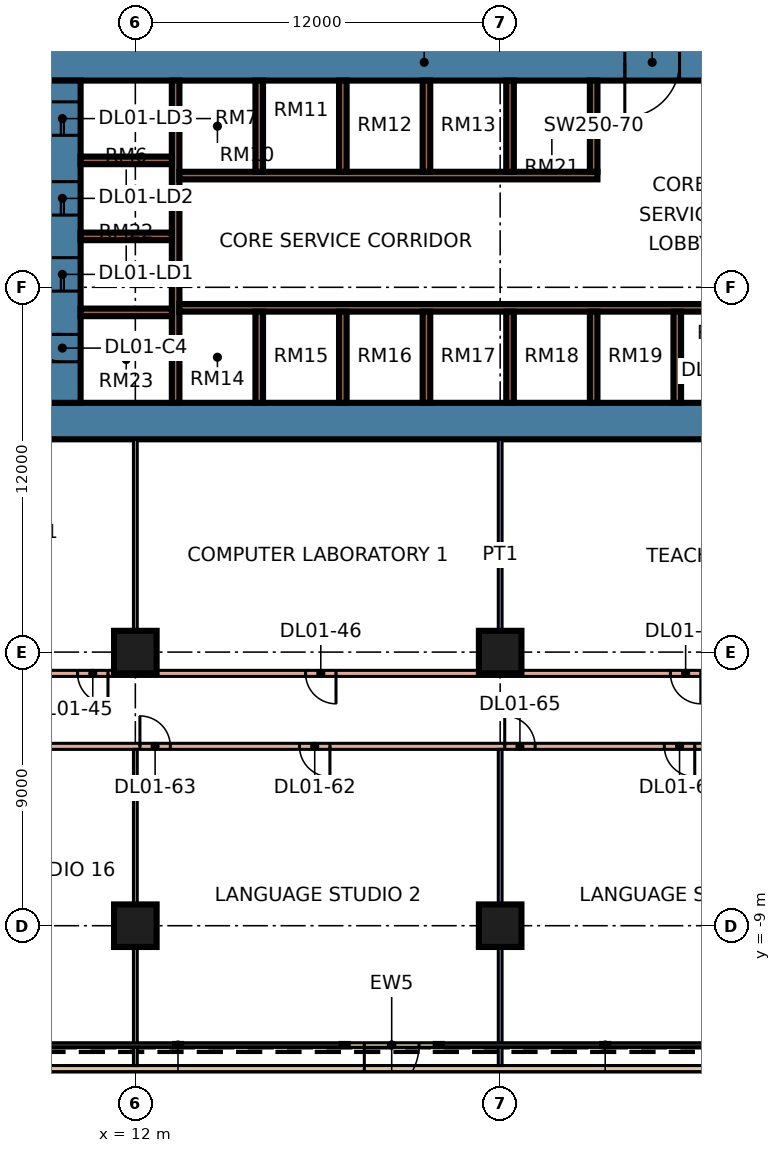
"""IFC4 building model, lengths in metres.
Left out: names, types, materials, properties, quantities, classifications, styles, units other than length and angle.
Written with IfcOpenShell. Run it as: python <this file> out.ifc"""

import sys

from ifc_helpers import new_model, si_unit, direction, frame, frame_2d, origin, origin_2d, place, context, subcontext, project, spatial, rectangle, extrude, element, fill, save


model = new_model("IFC4")
c1 = context("Model", 3, precision=1e-05, world=origin(), true_north=direction((0.0, 1.0)))
c2 = subcontext(c1, "Body", "Model", "MODEL_VIEW")
j1 = project(units=[si_unit("LENGTHUNIT", "METRE"), si_unit("PLANEANGLEUNIT", "RADIAN")], contexts=[c1])
p1 = place(None, origin())
s1 = spatial("IfcSite", under=j1, at=p1, CompositionType="ELEMENT")
p2 = place(p1, origin())
s2 = spatial("IfcBuilding", under=s1, at=p2, CompositionType="ELEMENT")
p3 = place(p2, frame((0.0, 0.0, 7.2)))
s3 = spatial("IfcBuildingStorey", under=s2, at=p3, CompositionType="ELEMENT", Elevation=7.2)
for number, where, z_axis, x_axis in (
    (1, (12.0, -9.0, 0.0), (0.0, 0.0, 1.0), (1.0, 0.0, 0.0)),
    (2, (24.0, -9.0, 0.0), (0.0, 0.0, 1.0), (1.0, 0.0, 0.0)),
    (3, (12.0, 0.0, 0.0), (0.0, 0.0, 1.0), (1.0, 0.0, 0.0)),
    (4, (24.0, 0.0, 0.0), (0.0, 0.0, 1.0), (1.0, 0.0, 0.0)),
):
    element("IfcColumn", number, at=place(p3, frame(where, z_axis=z_axis, x_axis=x_axis)), inside=s3, PredefinedType="COLUMN", context=c2, shape_type="SweptSolid", body=[
        extrude(rectangle(XDim=1.4, YDim=1.4, at=origin_2d()), origin(), (0.0, 0.0, 1.0), 4.8),
    ])
p4 = place(p3, frame((9.0, 7.6, 0.0), z_axis=(0.0, 0.0, 1.0), x_axis=(1.0, 0.0, 0.0)))
e5 = element("IfcWall", 5, at=p4, inside=s3, PredefinedType="SHEAR", context=c2, shape_type="SweptSolid", body=[
    extrude(rectangle(XDim=25.0, YDim=1.2, at=frame_2d((12.5, 0.0))), origin(), (0.0, 0.0, 1.0), 4.8),
])
p5 = place(p3, frame((9.0, 19.4, 0.0), z_axis=(0.0, 0.0, 1.0), x_axis=(1.0, 0.0, 0.0)))
e6 = element("IfcWall", 6, at=p5, inside=s3, PredefinedType="SHEAR", context=c2, shape_type="SweptSolid", body=[
    extrude(rectangle(XDim=25.0, YDim=1.2, at=frame_2d((12.5, 0.0))), origin(), (0.0, 0.0, 1.0), 4.8),
])
p6 = place(p5, frame((19.1, 0.0, 0.0)))
e7 = element("IfcOpeningElement", 7, at=p6, cuts=e6, PredefinedType="OPENING", context=c2, shape_type="SweptSolid", body=[
    extrude(rectangle(XDim=1.8, YDim=2.4, at=frame_2d((0.9, 1.2))), frame((0.0, 0.61, 0.0), z_axis=(0.0, -1.0, 0.0), x_axis=(1.0, 0.0, 0.0)), (0.0, 0.0, 1.0), 1.22),
])
p7 = place(p3, frame((9.6, 8.2, 0.0), z_axis=(0.0, 0.0, 1.0), x_axis=(0.0, 1.0, 0.0)))
e8 = element("IfcWall", 8, at=p7, inside=s3, PredefinedType="SHEAR", context=c2, shape_type="SweptSolid", body=[
    extrude(rectangle(XDim=10.6, YDim=1.2, at=frame_2d((5.3, 0.0))), origin(), (0.0, 0.0, 1.0), 4.8),
])
p8 = place(p7, frame((3.675, 0.0, 0.0)))
e9 = element("IfcOpeningElement", 9, at=p8, cuts=e8, PredefinedType="OPENING", context=c2, shape_type="SweptSolid", body=[
    extrude(rectangle(XDim=1.1, YDim=2.2, at=frame_2d((0.55, 1.1))), frame((0.0, 0.61, 0.0), z_axis=(0.0, -1.0, 0.0), x_axis=(1.0, 0.0, 0.0)), (0.0, 0.0, 1.0), 1.22),
])
p9 = place(p7, frame((6.175, 0.0, 0.0)))
e10 = element("IfcOpeningElement", 10, at=p9, cuts=e8, PredefinedType="OPENING", context=c2, shape_type="SweptSolid", body=[
    extrude(rectangle(XDim=1.1, YDim=2.2, at=frame_2d((0.55, 1.1))), frame((0.0, 0.61, 0.0), z_axis=(0.0, -1.0, 0.0), x_axis=(1.0, 0.0, 0.0)), (0.0, 0.0, 1.0), 1.22),
])
p10 = place(p7, frame((8.8, 0.0, 0.0)))
e11 = element("IfcOpeningElement", 11, at=p10, cuts=e8, PredefinedType="OPENING", context=c2, shape_type="SweptSolid", body=[
    extrude(rectangle(XDim=1.1, YDim=2.2, at=frame_2d((0.55, 1.1))), frame((0.0, 0.61, 0.0), z_axis=(0.0, -1.0, 0.0), x_axis=(1.0, 0.0, 0.0)), (0.0, 0.0, 1.0), 1.22),
])
p11 = place(p7, frame((1.35, 0.0, 0.0)))
e12 = element("IfcOpeningElement", 12, at=p11, cuts=e8, PredefinedType="OPENING", context=c2, shape_type="SweptSolid", body=[
    extrude(rectangle(XDim=0.9, YDim=2.1, at=frame_2d((0.45, 1.05))), frame((0.0, 0.61, 0.0), z_axis=(0.0, -1.0, 0.0), x_axis=(1.0, 0.0, 0.0)), (0.0, 0.0, 1.0), 1.22),
])
p12 = place(p3, frame((13.325, 8.2, 0.0), z_axis=(0.0, 0.0, 1.0), x_axis=(0.0, 1.0, 0.0)))
e13 = element("IfcWall", 13, at=p12, inside=s3, PredefinedType="SHEAR", context=c2, shape_type="SweptSolid", body=[
    extrude(rectangle(XDim=10.6, YDim=0.25, at=frame_2d((5.3, 0.0))), origin(), (0.0, 0.0, 1.0), 4.8),
])
p13 = place(p3, frame((13.45, 11.325, 0.0), z_axis=(0.0, 0.0, 1.0), x_axis=(1.0, 0.0, 0.0)))
e14 = element("IfcWall", 14, at=p13, inside=s3, PredefinedType="SHEAR", context=c2, shape_type="SweptSolid", body=[
    extrude(rectangle(XDim=19.35, YDim=0.25, at=frame_2d((9.675, 0.0))), origin(), (0.0, 0.0, 1.0), 4.8),
])
p14 = place(p3, frame((13.45, 15.675, 0.0), z_axis=(0.0, 0.0, 1.0), x_axis=(1.0, 0.0, 0.0)))
e15 = element("IfcWall", 15, at=p14, inside=s3, PredefinedType="SHEAR", context=c2, shape_type="SweptSolid", body=[
    extrude(rectangle(XDim=13.75, YDim=0.25, at=frame_2d((6.875, 0.0))), origin(), (0.0, 0.0, 1.0), 4.8),
])
for number, where, z_axis, x_axis in (
    (16, (10.2, 11.175, 0.0), (0.0, 0.0, 1.0), (1.0, 0.0, 0.0)),
    (17, (10.2, 13.675, 0.0), (0.0, 0.0, 1.0), (1.0, 0.0, 0.0)),
    (18, (10.2, 16.175, 0.0), (0.0, 0.0, 1.0), (1.0, 0.0, 0.0)),
    (19, (16.075, 8.2, 0.0), (0.0, 0.0, 1.0), (0.0, 1.0, 0.0)),
    (20, (18.825, 8.2, 0.0), (0.0, 0.0, 1.0), (0.0, 1.0, 0.0)),
    (21, (21.575, 8.2, 0.0), (0.0, 0.0, 1.0), (0.0, 1.0, 0.0)),
    (22, (24.325, 8.2, 0.0), (0.0, 0.0, 1.0), (0.0, 1.0, 0.0)),
    (23, (27.075, 8.2, 0.0), (0.0, 0.0, 1.0), (0.0, 1.0, 0.0)),
    (24, (29.825, 8.2, 0.0), (0.0, 0.0, 1.0), (0.0, 1.0, 0.0)),
    (25, (16.075, 15.8, 0.0), (0.0, 0.0, 1.0), (0.0, 1.0, 0.0)),
    (26, (18.825, 15.8, 0.0), (0.0, 0.0, 1.0), (0.0, 1.0, 0.0)),
    (27, (21.575, 15.8, 0.0), (0.0, 0.0, 1.0), (0.0, 1.0, 0.0)),
    (28, (24.325, 15.8, 0.0), (0.0, 0.0, 1.0), (0.0, 1.0, 0.0)),
    (29, (27.075, 15.8, 0.0), (0.0, 0.0, 1.0), (0.0, 1.0, 0.0)),
):
    element("IfcWall", number, at=place(p3, frame(where, z_axis=z_axis, x_axis=x_axis)), inside=s3, PredefinedType="SHEAR", context=c2, shape_type="SweptSolid", body=[
        extrude(rectangle(XDim=3.0, YDim=0.25, at=frame_2d((1.5, 0.0))), origin(), (0.0, 0.0, 1.0), 4.8),
    ])
p15 = place(p3, frame((18.932, -12.925, 0.0), z_axis=(0.0, 0.0, 1.0), x_axis=(1.0, 0.0, 0.0)))
e30 = element("IfcWall", 30, at=p15, inside=s3, PredefinedType="SOLIDWALL", context=c2, shape_type="SweptSolid", body=[
    extrude(rectangle(XDim=3.0, YDim=0.15, at=frame_2d((1.5, 0.0))), origin(), (0.0, 0.0, 1.0), 4.4),
])
p16 = place(p15, frame((0.6, 0.0, 0.0)))
e31 = element("IfcOpeningElement", 31, at=p16, cuts=e30, PredefinedType="OPENING", context=c2, shape_type="SweptSolid", body=[
    extrude(rectangle(XDim=1.8, YDim=2.4, at=frame_2d((0.9, 1.2))), frame((0.0, 0.085, 0.0), z_axis=(0.0, -1.0, 0.0), x_axis=(1.0, 0.0, 0.0)), (0.0, 0.0, 1.0), 0.17),
])
p17 = place(p3, frame((75.553, -13.7, 0.0), z_axis=(0.0, 0.0, 1.0), x_axis=(-1.0, 0.0, 0.0)))
e32 = element("IfcWall", 32, at=p17, inside=s3, PredefinedType="PARAPET", context=c2, shape_type="SweptSolid", body=[
    extrude(rectangle(XDim=68.107, YDim=0.2, at=frame_2d((34.053, 0.0))), origin(), (0.0, 0.0, 1.0), 0.5),
])
p18 = place(p3, frame((-1.953, -3.1, 0.0), z_axis=(0.0, 0.0, 1.0), x_axis=(1.0, 0.0, 0.0)))
e33 = element("IfcWall", 33, at=p18, inside=s3, PredefinedType="PARTITIONING", context=c2, shape_type="SweptSolid", body=[
    extrude(rectangle(XDim=77.053, YDim=0.2, at=frame_2d((38.526, 0.0))), origin(), (0.0, 0.0, 1.0), 4.4),
])
p19 = place(p18, frame((7.353, 0.0, 0.0)))
e34 = element("IfcOpeningElement", 34, at=p19, cuts=e33, PredefinedType="OPENING", context=c2, shape_type="SweptSolid", body=[
    extrude(rectangle(XDim=1.0, YDim=2.1, at=frame_2d((0.5, 1.05))), frame((0.0, 0.11, 0.0), z_axis=(0.0, -1.0, 0.0), x_axis=(1.0, 0.0, 0.0)), (0.0, 0.0, 1.0), 0.22),
])
p20 = place(p18, frame((19.353, 0.0, 0.0)))
e35 = element("IfcOpeningElement", 35, at=p20, cuts=e33, PredefinedType="OPENING", context=c2, shape_type="SweptSolid", body=[
    extrude(rectangle(XDim=1.0, YDim=2.1, at=frame_2d((0.5, 1.05))), frame((0.0, 0.11, 0.0), z_axis=(0.0, -1.0, 0.0), x_axis=(1.0, 0.0, 0.0)), (0.0, 0.0, 1.0), 0.22),
])
p21 = place(p18, frame((14.103, 0.0, 0.0)))
e36 = element("IfcOpeningElement", 36, at=p21, cuts=e33, PredefinedType="OPENING", context=c2, shape_type="SweptSolid", body=[
    extrude(rectangle(XDim=1.0, YDim=2.1, at=frame_2d((0.5, 1.05))), frame((0.0, 0.11, 0.0), z_axis=(0.0, -1.0, 0.0), x_axis=(1.0, 0.0, 0.0)), (0.0, 0.0, 1.0), 0.22),
])
p22 = place(p18, frame((31.353, 0.0, 0.0)))
e37 = element("IfcOpeningElement", 37, at=p22, cuts=e33, PredefinedType="OPENING", context=c2, shape_type="SweptSolid", body=[
    extrude(rectangle(XDim=1.0, YDim=2.1, at=frame_2d((0.5, 1.05))), frame((0.0, 0.11, 0.0), z_axis=(0.0, -1.0, 0.0), x_axis=(1.0, 0.0, 0.0)), (0.0, 0.0, 1.0), 0.22),
])
p23 = place(p18, frame((26.103, 0.0, 0.0)))
e38 = element("IfcOpeningElement", 38, at=p23, cuts=e33, PredefinedType="OPENING", context=c2, shape_type="SweptSolid", body=[
    extrude(rectangle(XDim=1.0, YDim=2.1, at=frame_2d((0.5, 1.05))), frame((0.0, 0.11, 0.0), z_axis=(0.0, -1.0, 0.0), x_axis=(1.0, 0.0, 0.0)), (0.0, 0.0, 1.0), 0.22),
])
p24 = place(p18, frame((41.853, 0.0, 0.0)))
e39 = element("IfcOpeningElement", 39, at=p24, cuts=e33, PredefinedType="OPENING", context=c2, shape_type="SweptSolid", body=[
    extrude(rectangle(XDim=1.0, YDim=2.1, at=frame_2d((0.5, 1.05))), frame((0.0, 0.11, 0.0), z_axis=(0.0, -1.0, 0.0), x_axis=(1.0, 0.0, 0.0)), (0.0, 0.0, 1.0), 0.22),
])
p25 = place(p18, frame((50.853, 0.0, 0.0)))
e40 = element("IfcOpeningElement", 40, at=p25, cuts=e33, PredefinedType="OPENING", context=c2, shape_type="SweptSolid", body=[
    extrude(rectangle(XDim=1.0, YDim=2.1, at=frame_2d((0.5, 1.05))), frame((0.0, 0.11, 0.0), z_axis=(0.0, -1.0, 0.0), x_axis=(1.0, 0.0, 0.0)), (0.0, 0.0, 1.0), 0.22),
])
p26 = place(p18, frame((59.853, 0.0, 0.0)))
e41 = element("IfcOpeningElement", 41, at=p26, cuts=e33, PredefinedType="OPENING", context=c2, shape_type="SweptSolid", body=[
    extrude(rectangle(XDim=1.0, YDim=2.1, at=frame_2d((0.5, 1.05))), frame((0.0, 0.11, 0.0), z_axis=(0.0, -1.0, 0.0), x_axis=(1.0, 0.0, 0.0)), (0.0, 0.0, 1.0), 0.22),
])
p27 = place(p18, frame((68.853, 0.0, 0.0)))
e42 = element("IfcOpeningElement", 42, at=p27, cuts=e33, PredefinedType="OPENING", context=c2, shape_type="SweptSolid", body=[
    extrude(rectangle(XDim=1.0, YDim=2.1, at=frame_2d((0.5, 1.05))), frame((0.0, 0.11, 0.0), z_axis=(0.0, -1.0, 0.0), x_axis=(1.0, 0.0, 0.0)), (0.0, 0.0, 1.0), 0.22),
])
p28 = place(p18, frame((75.103, 0.0, 0.0)))
e43 = element("IfcOpeningElement", 43, at=p28, cuts=e33, PredefinedType="OPENING", context=c2, shape_type="SweptSolid", body=[
    extrude(rectangle(XDim=1.0, YDim=2.1, at=frame_2d((0.5, 1.05))), frame((0.0, 0.11, 0.0), z_axis=(0.0, -1.0, 0.0), x_axis=(1.0, 0.0, 0.0)), (0.0, 0.0, 1.0), 0.22),
])
p29 = place(p3, frame((-0.8, -0.7, 0.0), z_axis=(0.0, 0.0, 1.0), x_axis=(1.0, 0.0, 0.0)))
e44 = element("IfcWall", 44, at=p29, inside=s3, PredefinedType="PARTITIONING", context=c2, shape_type="SweptSolid", body=[
    extrude(rectangle(XDim=45.8, YDim=0.2, at=frame_2d((22.9, 0.0))), origin(), (0.0, 0.0, 1.0), 4.4),
])
p30 = place(p29, frame((40.9, 0.0, 0.0)))
e45 = element("IfcOpeningElement", 45, at=p30, cuts=e44, PredefinedType="OPENING", context=c2, shape_type="SweptSolid", body=[
    extrude(rectangle(XDim=1.0, YDim=2.1, at=frame_2d((0.5, 1.05))), frame((0.0, 0.11, 0.0), z_axis=(0.0, -1.0, 0.0), x_axis=(1.0, 0.0, 0.0)), (0.0, 0.0, 1.0), 0.22),
])
p31 = place(p29, frame((5.9, 0.0, 0.0)))
e46 = element("IfcOpeningElement", 46, at=p31, cuts=e44, PredefinedType="OPENING", context=c2, shape_type="SweptSolid", body=[
    extrude(rectangle(XDim=1.0, YDim=2.1, at=frame_2d((0.5, 1.05))), frame((0.0, 0.11, 0.0), z_axis=(0.0, -1.0, 0.0), x_axis=(1.0, 0.0, 0.0)), (0.0, 0.0, 1.0), 0.22),
])
p32 = place(p29, frame((10.9, 0.0, 0.0)))
e47 = element("IfcOpeningElement", 47, at=p32, cuts=e44, PredefinedType="OPENING", context=c2, shape_type="SweptSolid", body=[
    extrude(rectangle(XDim=1.0, YDim=2.1, at=frame_2d((0.5, 1.05))), frame((0.0, 0.11, 0.0), z_axis=(0.0, -1.0, 0.0), x_axis=(1.0, 0.0, 0.0)), (0.0, 0.0, 1.0), 0.22),
])
p33 = place(p29, frame((18.4, 0.0, 0.0)))
e48 = element("IfcOpeningElement", 48, at=p33, cuts=e44, PredefinedType="OPENING", context=c2, shape_type="SweptSolid", body=[
    extrude(rectangle(XDim=1.0, YDim=2.1, at=frame_2d((0.5, 1.05))), frame((0.0, 0.11, 0.0), z_axis=(0.0, -1.0, 0.0), x_axis=(1.0, 0.0, 0.0)), (0.0, 0.0, 1.0), 0.22),
])
p34 = place(p29, frame((30.4, 0.0, 0.0)))
e49 = element("IfcOpeningElement", 49, at=p34, cuts=e44, PredefinedType="OPENING", context=c2, shape_type="SweptSolid", body=[
    extrude(rectangle(XDim=1.0, YDim=2.1, at=frame_2d((0.5, 1.05))), frame((0.0, 0.11, 0.0), z_axis=(0.0, -1.0, 0.0), x_axis=(1.0, 0.0, 0.0)), (0.0, 0.0, 1.0), 0.22),
])
p35 = place(p3, frame((12.0, -13.6, 0.0), z_axis=(0.0, 0.0, 1.0), x_axis=(0.0, 1.0, 0.0)))
e50 = element("IfcWall", 50, at=p35, inside=s3, PredefinedType="PARTITIONING", context=c2, shape_type="SweptSolid", body=[
    extrude(rectangle(XDim=10.4, YDim=0.125, at=frame_2d((5.2, 0.0))), origin(), (0.0, 0.0, 1.0), 4.4),
])
p36 = place(p3, frame((12.0, -0.6, 0.0), z_axis=(0.0, 0.0, 1.0), x_axis=(0.0, 1.0, 0.0)))
e51 = element("IfcWall", 51, at=p36, inside=s3, PredefinedType="PARTITIONING", context=c2, shape_type="SweptSolid", body=[
    extrude(rectangle(XDim=7.6, YDim=0.125, at=frame_2d((3.8, 0.0))), origin(), (0.0, 0.0, 1.0), 4.4),
])
p37 = place(p3, frame((24.0, -13.6, 0.0), z_axis=(0.0, 0.0, 1.0), x_axis=(0.0, 1.0, 0.0)))
e52 = element("IfcWall", 52, at=p37, inside=s3, PredefinedType="PARTITIONING", context=c2, shape_type="SweptSolid", body=[
    extrude(rectangle(XDim=10.4, YDim=0.125, at=frame_2d((5.2, 0.0))), origin(), (0.0, 0.0, 1.0), 4.4),
])
p38 = place(p3, frame((24.0, -0.6, 0.0), z_axis=(0.0, 0.0, 1.0), x_axis=(0.0, 1.0, 0.0)))
e53 = element("IfcWall", 53, at=p38, inside=s3, PredefinedType="PARTITIONING", context=c2, shape_type="SweptSolid", body=[
    extrude(rectangle(XDim=7.6, YDim=0.125, at=frame_2d((3.8, 0.0))), origin(), (0.0, 0.0, 1.0), 4.4),
])
p39 = place(p16, frame((1.8, 0.0, 0.0), z_axis=(0.0, 0.0, 1.0), x_axis=(-1.0, 0.0, 0.0)))
e54 = element("IfcDoor", 54, at=p39, inside=s3, OperationType="DOUBLE_DOOR_SINGLE_SWING", PredefinedType="DOOR", context=c2, shape_type="SweptSolid", body=[
    extrude(rectangle(XDim=1.8, YDim=2.4, at=frame_2d((0.9, 1.2))), frame((0.0, 0.025, 0.0), z_axis=(0.0, -1.0, 0.0), x_axis=(1.0, 0.0, 0.0)), (0.0, 0.0, 1.0), 0.05),
])
fill(e31, e54)
p40 = place(p8, origin())
e55 = element("IfcDoor", 55, at=p40, inside=s3, OperationType="DOUBLE_DOOR_SLIDING", PredefinedType="DOOR", context=c2, shape_type="SweptSolid", body=[
    extrude(rectangle(XDim=1.1, YDim=2.2, at=frame_2d((0.55, 1.1))), frame((0.0, 0.025, 0.0), z_axis=(0.0, -1.0, 0.0), x_axis=(1.0, 0.0, 0.0)), (0.0, 0.0, 1.0), 0.05),
])
fill(e9, e55)
p41 = place(p9, origin())
e56 = element("IfcDoor", 56, at=p41, inside=s3, OperationType="DOUBLE_DOOR_SLIDING", PredefinedType="DOOR", context=c2, shape_type="SweptSolid", body=[
    extrude(rectangle(XDim=1.1, YDim=2.2, at=frame_2d((0.55, 1.1))), frame((0.0, 0.025, 0.0), z_axis=(0.0, -1.0, 0.0), x_axis=(1.0, 0.0, 0.0)), (0.0, 0.0, 1.0), 0.05),
])
fill(e10, e56)
p42 = place(p10, origin())
e57 = element("IfcDoor", 57, at=p42, inside=s3, OperationType="DOUBLE_DOOR_SLIDING", PredefinedType="DOOR", context=c2, shape_type="SweptSolid", body=[
    extrude(rectangle(XDim=1.1, YDim=2.2, at=frame_2d((0.55, 1.1))), frame((0.0, 0.025, 0.0), z_axis=(0.0, -1.0, 0.0), x_axis=(1.0, 0.0, 0.0)), (0.0, 0.0, 1.0), 0.05),
])
fill(e11, e57)
p43 = place(p6, frame((1.8, 0.0, 0.0), z_axis=(0.0, 0.0, 1.0), x_axis=(-1.0, 0.0, 0.0)))
e58 = element("IfcDoor", 58, at=p43, inside=s3, OperationType="DOUBLE_DOOR_SINGLE_SWING", PredefinedType="DOOR", context=c2, shape_type="SweptSolid", body=[
    extrude(rectangle(XDim=1.8, YDim=2.4, at=frame_2d((0.9, 1.2))), frame((0.0, 0.025, 0.0), z_axis=(0.0, -1.0, 0.0), x_axis=(1.0, 0.0, 0.0)), (0.0, 0.0, 1.0), 0.05),
])
fill(e7, e58)
p44 = place(p11, frame((0.9, 0.0, 0.0), z_axis=(0.0, 0.0, 1.0), x_axis=(-1.0, 0.0, 0.0)))
e59 = element("IfcDoor", 59, at=p44, inside=s3, OperationType="SINGLE_SWING_RIGHT", PredefinedType="DOOR", context=c2, shape_type="SweptSolid", body=[
    extrude(rectangle(XDim=0.9, YDim=2.1, at=frame_2d((0.45, 1.05))), frame((0.0, 0.025, 0.0), z_axis=(0.0, -1.0, 0.0), x_axis=(1.0, 0.0, 0.0)), (0.0, 0.0, 1.0), 0.05),
])
fill(e12, e59)
p45 = place(p32, origin())
e60 = element("IfcDoor", 60, at=p45, inside=s3, OperationType="SINGLE_SWING_RIGHT", PredefinedType="DOOR", context=c2, shape_type="SweptSolid", body=[
    extrude(rectangle(XDim=1.0, YDim=2.1, at=frame_2d((0.5, 1.05))), frame((0.0, 0.025, 0.0), z_axis=(0.0, -1.0, 0.0), x_axis=(1.0, 0.0, 0.0)), (0.0, 0.0, 1.0), 0.05),
])
fill(e47, e60)
p46 = place(p33, origin())
e61 = element("IfcDoor", 61, at=p46, inside=s3, OperationType="SINGLE_SWING_RIGHT", PredefinedType="DOOR", context=c2, shape_type="SweptSolid", body=[
    extrude(rectangle(XDim=1.0, YDim=2.1, at=frame_2d((0.5, 1.05))), frame((0.0, 0.025, 0.0), z_axis=(0.0, -1.0, 0.0), x_axis=(1.0, 0.0, 0.0)), (0.0, 0.0, 1.0), 0.05),
])
fill(e48, e61)
p47 = place(p34, origin())
e62 = element("IfcDoor", 62, at=p47, inside=s3, OperationType="SINGLE_SWING_RIGHT", PredefinedType="DOOR", context=c2, shape_type="SweptSolid", body=[
    extrude(rectangle(XDim=1.0, YDim=2.1, at=frame_2d((0.5, 1.05))), frame((0.0, 0.025, 0.0), z_axis=(0.0, -1.0, 0.0), x_axis=(1.0, 0.0, 0.0)), (0.0, 0.0, 1.0), 0.05),
])
fill(e49, e62)
p48 = place(p20, origin())
e63 = element("IfcDoor", 63, at=p48, inside=s3, OperationType="SINGLE_SWING_RIGHT", PredefinedType="DOOR", context=c2, shape_type="SweptSolid", body=[
    extrude(rectangle(XDim=1.0, YDim=2.1, at=frame_2d((0.5, 1.05))), frame((0.0, 0.025, 0.0), z_axis=(0.0, -1.0, 0.0), x_axis=(1.0, 0.0, 0.0)), (0.0, 0.0, 1.0), 0.05),
])
fill(e35, e63)
p49 = place(p21, origin())
e64 = element("IfcDoor", 64, at=p49, inside=s3, OperationType="SINGLE_SWING_LEFT", PredefinedType="DOOR", context=c2, shape_type="SweptSolid", body=[
    extrude(rectangle(XDim=1.0, YDim=2.1, at=frame_2d((0.5, 1.05))), frame((0.0, 0.025, 0.0), z_axis=(0.0, -1.0, 0.0), x_axis=(1.0, 0.0, 0.0)), (0.0, 0.0, 1.0), 0.05),
])
fill(e36, e64)
p50 = place(p22, origin())
e65 = element("IfcDoor", 65, at=p50, inside=s3, OperationType="SINGLE_SWING_RIGHT", PredefinedType="DOOR", context=c2, shape_type="SweptSolid", body=[
    extrude(rectangle(XDim=1.0, YDim=2.1, at=frame_2d((0.5, 1.05))), frame((0.0, 0.025, 0.0), z_axis=(0.0, -1.0, 0.0), x_axis=(1.0, 0.0, 0.0)), (0.0, 0.0, 1.0), 0.05),
])
fill(e37, e65)
p51 = place(p23, origin())
e66 = element("IfcDoor", 66, at=p51, inside=s3, OperationType="SINGLE_SWING_LEFT", PredefinedType="DOOR", context=c2, shape_type="SweptSolid", body=[
    extrude(rectangle(XDim=1.0, YDim=2.1, at=frame_2d((0.5, 1.05))), frame((0.0, 0.025, 0.0), z_axis=(0.0, -1.0, 0.0), x_axis=(1.0, 0.0, 0.0)), (0.0, 0.0, 1.0), 0.05),
])
fill(e38, e66)
save(model, sys.argv[1])
